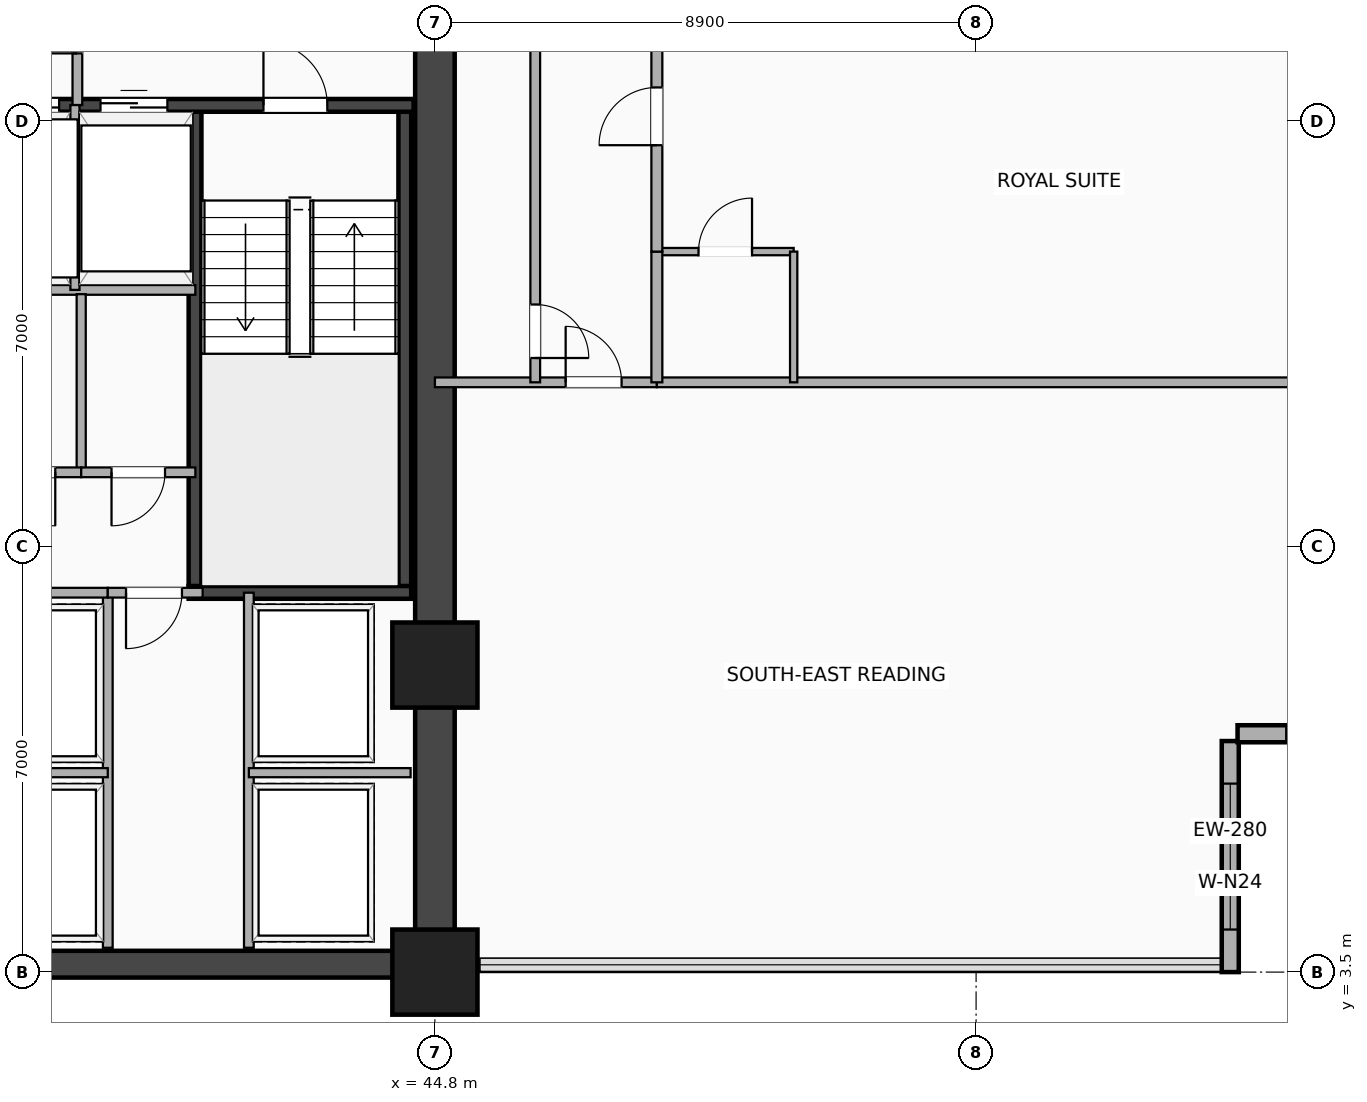
"""IFC4 building model, lengths in metres.
Left out: names, types, materials, properties, quantities, classifications, styles, units other than length and angle.
Written with IfcOpenShell. Run it as: python <this file> out.ifc"""

import sys

from ifc_helpers import new_model, si_unit, direction, frame, frame_2d, origin, origin_2d, place, context, subcontext, project, spatial, rectangle, extrude, element, fill, save


model = new_model("IFC4")
c1 = context("Model", 3, precision=1e-05, world=origin(), true_north=direction((0.0, 1.0)))
c2 = subcontext(c1, "Body", "Model", "MODEL_VIEW")
j1 = project(units=[si_unit("LENGTHUNIT", "METRE"), si_unit("PLANEANGLEUNIT", "RADIAN")], contexts=[c1])
p1 = place(None, origin())
s1 = spatial("IfcSite", under=j1, at=p1, CompositionType="ELEMENT")
p2 = place(p1, origin())
s2 = spatial("IfcBuilding", under=s1, at=p2, CompositionType="ELEMENT")
p3 = place(p2, frame((0.0, 0.0, 64.9)))
s3 = spatial("IfcBuildingStorey", under=s2, at=p3, CompositionType="ELEMENT", Elevation=64.9)
p4 = place(p3, frame((20.3, 3.63, 0.0), z_axis=(0.0, 0.0, 1.0), x_axis=(1.0, 0.0, 0.0)))
e1 = element("IfcWall", 1, at=p4, inside=s3, PredefinedType="SHEAR", context=c2, shape_type="SweptSolid", body=[
    extrude(rectangle(XDim=24.5, YDim=0.44, at=frame_2d((12.25, 0.0))), origin(), (0.0, 0.0, 1.0), 3.22),
])
p5 = place(p3, frame((44.8, 3.5, 0.0), z_axis=(0.0, 0.0, 1.0), x_axis=(0.0, 1.0, 0.0)))
e2 = element("IfcWall", 2, at=p5, inside=s3, PredefinedType="SHEAR", context=c2, shape_type="SweptSolid", body=[
    extrude(rectangle(XDim=16.9, YDim=0.65, at=frame_2d((8.45, 0.0))), origin(), (0.0, 0.0, 1.0), 3.22),
])
for number, where, z_axis, x_axis in (
    (3, (40.855, 9.745, 0.0), (0.0, 0.0, 1.0), (0.0, 1.0, 0.0)),
    (4, (44.305, 9.745, 0.0), (0.0, 0.0, 1.0), (0.0, 1.0, 0.0)),
):
    element("IfcWall", number, at=place(p3, frame(where, z_axis=z_axis, x_axis=x_axis)), inside=s3, PredefinedType="SHEAR", context=c2, shape_type="SweptSolid", body=[
        extrude(rectangle(XDim=8.01, YDim=0.21, at=frame_2d((4.005, 0.0))), origin(), (0.0, 0.0, 1.0), 3.22),
    ])
p6 = place(p3, frame((40.75, 9.745, 0.0), z_axis=(0.0, 0.0, 1.0), x_axis=(1.0, 0.0, 0.0)))
e5 = element("IfcWall", 5, at=p6, inside=s3, PredefinedType="SHEAR", context=c2, shape_type="SweptSolid", body=[
    extrude(rectangle(XDim=3.66, YDim=0.21, at=frame_2d((1.83, 0.0))), origin(), (0.0, 0.0, 1.0), 3.22),
])
p7 = place(p3, frame((37.25, 17.755, 0.0), z_axis=(0.0, 0.0, 1.0), x_axis=(1.0, 0.0, 0.0)))
e6 = element("IfcWall", 6, at=p7, inside=s3, PredefinedType="SHEAR", context=c2, shape_type="SweptSolid", body=[
    extrude(rectangle(XDim=7.2, YDim=0.21, at=frame_2d((3.6, 0.0))), origin(), (0.0, 0.0, 1.0), 3.22),
])
p8 = place(p7, frame((0.25, 0.0, 0.0)))
e7 = element("IfcOpeningElement", 7, at=p8, cuts=e6, PredefinedType="OPENING", context=c2, shape_type="SweptSolid", body=[
    extrude(rectangle(XDim=1.12, YDim=2.2, at=frame_2d((0.56, 1.1))), frame((0.0, 0.115, 0.0), z_axis=(0.0, -1.0, 0.0), x_axis=(1.0, 0.0, 0.0)), (0.0, 0.0, 1.0), 0.23),
])
p9 = place(p7, frame((2.05, 0.0, 0.0)))
e8 = element("IfcOpeningElement", 8, at=p9, cuts=e6, PredefinedType="OPENING", context=c2, shape_type="SweptSolid", body=[
    extrude(rectangle(XDim=1.1, YDim=2.18, at=frame_2d((0.55, 1.09))), frame((0.0, 0.115, 0.0), z_axis=(0.0, -1.0, 0.0), x_axis=(1.0, 0.0, 0.0)), (0.0, 0.0, 1.0), 0.23),
])
p10 = place(p7, frame((5.78, 0.0, 0.0), z_axis=(0.0, 0.0, 1.0), x_axis=(-1.0, 0.0, 0.0)))
e9 = element("IfcOpeningElement", 9, at=p10, cuts=e6, PredefinedType="OPENING", context=c2, shape_type="SweptSolid", body=[
    extrude(rectangle(XDim=1.05, YDim=2.15, at=frame_2d((0.525, 1.075))), frame((0.0, 0.115, 0.0), z_axis=(0.0, -1.0, 0.0), x_axis=(1.0, 0.0, 0.0)), (0.0, 0.0, 1.0), 0.23),
])
for number, where, z_axis, x_axis in (
    (10, (44.8, 3.5, -0.28), (0.0, 0.0, 1.0), (1.0, 0.0, 0.0)),
    (11, (44.8, 8.55, -0.28), (0.0, 0.0, 1.0), (1.0, 0.0, 0.0)),
):
    element("IfcColumn", number, at=place(p3, frame(where, z_axis=z_axis, x_axis=x_axis)), inside=s3, PredefinedType="COLUMN", context=c2, shape_type="SweptSolid", body=[
        extrude(rectangle(XDim=1.4, YDim=1.4, at=origin_2d()), origin(), (0.0, 0.0, 1.0), 3.5),
    ])
p11 = place(p3, frame((57.88, 3.5, 0.0), z_axis=(0.0, 0.0, 1.0), x_axis=(0.0, 1.0, 0.0)))
e12 = element("IfcWall", 12, at=p11, inside=s3, PredefinedType="SOLIDWALL", context=c2, shape_type="SweptSolid", body=[
    extrude(rectangle(XDim=3.8, YDim=0.28, at=frame_2d((1.9, 0.0))), origin(), (0.0, 0.0, 1.0), 3.22),
])
p12 = place(p11, frame((0.7, 0.0, 0.85)))
e13 = element("IfcOpeningElement", 13, at=p12, cuts=e12, PredefinedType="OPENING", context=c2, shape_type="SweptSolid", body=[
    extrude(rectangle(XDim=2.4, YDim=1.65, at=frame_2d((1.2, 0.825))), frame((0.0, 0.15, 0.0), z_axis=(0.0, -1.0, 0.0), x_axis=(1.0, 0.0, 0.0)), (0.0, 0.0, 1.0), 0.3),
])
p13 = place(p3, frame((58.0, 7.42, 0.0), z_axis=(0.0, 0.0, 1.0), x_axis=(1.0, 0.0, 0.0)))
e14 = element("IfcWall", 14, at=p13, inside=s3, PredefinedType="SOLIDWALL", context=c2, shape_type="SweptSolid", body=[
    extrude(rectangle(XDim=3.8, YDim=0.28, at=frame_2d((1.9, 0.0))), origin(), (0.0, 0.0, 1.0), 3.22),
])
p14 = place(p13, frame((0.8, 0.0, 0.85)))
e15 = element("IfcOpeningElement", 15, at=p14, cuts=e14, PredefinedType="OPENING", context=c2, shape_type="SweptSolid", body=[
    extrude(rectangle(XDim=2.2, YDim=1.65, at=frame_2d((1.1, 0.825))), frame((0.0, 0.15, 0.0), z_axis=(0.0, -1.0, 0.0), x_axis=(1.0, 0.0, 0.0)), (0.0, 0.0, 1.0), 0.3),
])
p15 = place(p3, frame((38.92, 17.76, 0.0), z_axis=(0.0, 0.0, 1.0), x_axis=(0.0, 1.0, 0.0)))
e16 = element("IfcWall", 16, at=p15, inside=s3, PredefinedType="PARTITIONING", context=c2, shape_type="SweptSolid", body=[
    extrude(rectangle(XDim=2.66, YDim=0.16, at=frame_2d((1.33, 0.0))), origin(), (0.0, 0.0, 1.0), 2.51),
])
p16 = place(p15, frame((1.77, 0.0, 0.0), z_axis=(0.0, 0.0, 1.0), x_axis=(-1.0, 0.0, 0.0)))
e17 = element("IfcOpeningElement", 17, at=p16, cuts=e16, PredefinedType="OPENING", context=c2, shape_type="SweptSolid", body=[
    extrude(rectangle(XDim=0.92, YDim=2.08, at=frame_2d((0.46, 1.04))), frame((0.0, 0.09, 0.0), z_axis=(0.0, -1.0, 0.0), x_axis=(1.0, 0.0, 0.0)), (0.0, 0.0, 1.0), 0.18),
])
p17 = place(p3, frame((37.25, 14.72, 0.0), z_axis=(0.0, 0.0, 1.0), x_axis=(1.0, 0.0, 0.0)))
e18 = element("IfcWall", 18, at=p17, inside=s3, PredefinedType="PARTITIONING", context=c2, shape_type="SweptSolid", body=[
    extrude(rectangle(XDim=3.61, YDim=0.16, at=frame_2d((1.805, 0.0))), origin(), (0.0, 0.0, 1.0), 3.22),
])
p18 = place(p3, frame((38.88, 14.72, 0.0), z_axis=(0.0, 0.0, 1.0), x_axis=(0.0, 1.0, 0.0)))
e19 = element("IfcWall", 19, at=p18, inside=s3, PredefinedType="PARTITIONING", context=c2, shape_type="SweptSolid", body=[
    extrude(rectangle(XDim=3.04, YDim=0.15, at=frame_2d((1.52, 0.0))), origin(), (0.0, 0.0, 1.0), 3.22),
])
p19 = place(p3, frame((38.983, 11.72, 0.0), z_axis=(0.0, 0.0, 1.0), x_axis=(0.0, 1.0, 0.0)))
e20 = element("IfcWall", 20, at=p19, inside=s3, PredefinedType="PARTITIONING", context=c2, shape_type="SweptSolid", body=[
    extrude(rectangle(XDim=2.93, YDim=0.15, at=frame_2d((1.465, 0.0))), origin(), (0.0, 0.0, 1.0), 3.22),
])
p20 = place(p3, frame((37.25, 11.72, 0.0), z_axis=(0.0, 0.0, 1.0), x_axis=(1.0, 0.0, 0.0)))
e21 = element("IfcWall", 21, at=p20, inside=s3, PredefinedType="PARTITIONING", context=c2, shape_type="SweptSolid", body=[
    extrude(rectangle(XDim=1.733, YDim=0.16, at=frame_2d((0.866, 0.0))), origin(), (0.0, 0.0, 1.0), 3.22),
])
p21 = place(p20, frame((0.427, 0.0, 0.0)))
e22 = element("IfcOpeningElement", 22, at=p21, cuts=e21, PredefinedType="OPENING", context=c2, shape_type="SweptSolid", body=[
    extrude(rectangle(XDim=0.88, YDim=2.08, at=frame_2d((0.44, 1.04))), frame((0.0, 0.09, 0.0), z_axis=(0.0, -1.0, 0.0), x_axis=(1.0, 0.0, 0.0)), (0.0, 0.0, 1.0), 0.18),
])
p22 = place(p3, frame((38.983, 11.72, 0.0), z_axis=(0.0, 0.0, 1.0), x_axis=(1.0, 0.0, 0.0)))
e23 = element("IfcWall", 23, at=p22, inside=s3, PredefinedType="PARTITIONING", context=c2, shape_type="SweptSolid", body=[
    extrude(rectangle(XDim=1.877, YDim=0.16, at=frame_2d((0.938, 0.0))), origin(), (0.0, 0.0, 1.0), 3.22),
])
p23 = place(p22, frame((0.499, 0.0, 0.0)))
e24 = element("IfcOpeningElement", 24, at=p23, cuts=e23, PredefinedType="OPENING", context=c2, shape_type="SweptSolid", body=[
    extrude(rectangle(XDim=0.88, YDim=2.08, at=frame_2d((0.44, 1.04))), frame((0.0, 0.09, 0.0), z_axis=(0.0, -1.0, 0.0), x_axis=(1.0, 0.0, 0.0)), (0.0, 0.0, 1.0), 0.18),
])
for number, where, z_axis, x_axis in (
    (25, (39.42, 3.9, 0.0), (0.0, 0.0, 1.0), (0.0, 1.0, 0.0)),
    (26, (41.74, 3.9, 0.0), (0.0, 0.0, 1.0), (0.0, 1.0, 0.0)),
):
    element("IfcWall", number, at=place(p3, frame(where, z_axis=z_axis, x_axis=x_axis)), inside=s3, PredefinedType="PARTITIONING", context=c2, shape_type="SweptSolid", body=[
        extrude(rectangle(XDim=5.84, YDim=0.16, at=frame_2d((2.92, 0.0))), origin(), (0.0, 0.0, 1.0), 3.22),
    ])
p24 = place(p3, frame((37.25, 6.78, 0.0), z_axis=(0.0, 0.0, 1.0), x_axis=(1.0, 0.0, 0.0)))
e27 = element("IfcWall", 27, at=p24, inside=s3, PredefinedType="PARTITIONING", context=c2, shape_type="SweptSolid", body=[
    extrude(rectangle(XDim=2.17, YDim=0.15, at=frame_2d((1.085, 0.0))), origin(), (0.0, 0.0, 1.0), 3.22),
])
p25 = place(p3, frame((41.74, 6.78, 0.0), z_axis=(0.0, 0.0, 1.0), x_axis=(1.0, 0.0, 0.0)))
e28 = element("IfcWall", 28, at=p25, inside=s3, PredefinedType="PARTITIONING", context=c2, shape_type="SweptSolid", body=[
    extrude(rectangle(XDim=2.66, YDim=0.15, at=frame_2d((1.33, 0.0))), origin(), (0.0, 0.0, 1.0), 2.51),
])
p26 = place(p3, frame((37.25, 9.74, 0.0), z_axis=(0.0, 0.0, 1.0), x_axis=(1.0, 0.0, 0.0)))
e29 = element("IfcWall", 29, at=p26, inside=s3, PredefinedType="PARTITIONING", context=c2, shape_type="SweptSolid", body=[
    extrude(rectangle(XDim=2.17, YDim=0.16, at=frame_2d((1.085, 0.0))), origin(), (0.0, 0.0, 1.0), 3.22),
])
p27 = place(p3, frame((39.42, 9.74, 0.0), z_axis=(0.0, 0.0, 1.0), x_axis=(1.0, 0.0, 0.0)))
e30 = element("IfcWall", 30, at=p27, inside=s3, PredefinedType="PARTITIONING", context=c2, shape_type="SweptSolid", body=[
    extrude(rectangle(XDim=1.56, YDim=0.16, at=frame_2d((0.78, 0.0))), origin(), (0.0, 0.0, 1.0), 3.22),
])
p28 = place(p27, frame((0.3, 0.0, 0.0)))
e31 = element("IfcOpeningElement", 31, at=p28, cuts=e30, PredefinedType="OPENING", context=c2, shape_type="SweptSolid", body=[
    extrude(rectangle(XDim=0.92, YDim=2.08, at=frame_2d((0.46, 1.04))), frame((0.0, 0.09, 0.0), z_axis=(0.0, -1.0, 0.0), x_axis=(1.0, 0.0, 0.0)), (0.0, 0.0, 1.0), 0.18),
])
p29 = place(p3, frame((44.8, 13.2, 0.0), z_axis=(0.0, 0.0, 1.0), x_axis=(1.0, 0.0, 0.0)))
e32 = element("IfcWall", 32, at=p29, inside=s3, PredefinedType="PARTITIONING", context=c2, shape_type="SweptSolid", body=[
    extrude(rectangle(XDim=3.65, YDim=0.16, at=frame_2d((1.825, 0.0))), origin(), (0.0, 0.0, 1.0), 2.51),
])
p30 = place(p29, frame((3.07, 0.0, 0.0), z_axis=(0.0, 0.0, 1.0), x_axis=(-1.0, 0.0, 0.0)))
e33 = element("IfcOpeningElement", 33, at=p30, cuts=e32, PredefinedType="OPENING", context=c2, shape_type="SweptSolid", body=[
    extrude(rectangle(XDim=0.92, YDim=2.08, at=frame_2d((0.46, 1.04))), frame((0.0, 0.09, 0.0), z_axis=(0.0, -1.0, 0.0), x_axis=(1.0, 0.0, 0.0)), (0.0, 0.0, 1.0), 0.18),
])
p31 = place(p3, frame((46.45, 13.2, 0.0), z_axis=(0.0, 0.0, 1.0), x_axis=(0.0, 1.0, 0.0)))
e34 = element("IfcWall", 34, at=p31, inside=s3, PredefinedType="PARTITIONING", context=c2, shape_type="SweptSolid", body=[
    extrude(rectangle(XDim=7.22, YDim=0.16, at=frame_2d((3.61, 0.0))), origin(), (0.0, 0.0, 1.0), 2.51),
])
p32 = place(p31, frame((0.4, 0.0, 0.0)))
e35 = element("IfcOpeningElement", 35, at=p32, cuts=e34, PredefinedType="OPENING", context=c2, shape_type="SweptSolid", body=[
    extrude(rectangle(XDim=0.88, YDim=2.08, at=frame_2d((0.44, 1.04))), frame((0.0, 0.09, 0.0), z_axis=(0.0, -1.0, 0.0), x_axis=(1.0, 0.0, 0.0)), (0.0, 0.0, 1.0), 0.18),
])
p33 = place(p3, frame((48.45, 13.2, 0.0), z_axis=(0.0, 0.0, 1.0), x_axis=(1.0, 0.0, 0.0)))
e36 = element("IfcWall", 36, at=p33, inside=s3, PredefinedType="PARTITIONING", context=c2, shape_type="SweptSolid", body=[
    extrude(rectangle(XDim=13.23, YDim=0.16, at=frame_2d((6.615, 0.0))), origin(), (0.0, 0.0, 1.0), 2.583),
])
p34 = place(p3, frame((48.45, 15.35, 0.0), z_axis=(0.0, 0.0, 1.0), x_axis=(1.0, 0.0, 0.0)))
e37 = element("IfcWall", 37, at=p34, inside=s3, PredefinedType="PARTITIONING", context=c2, shape_type="SweptSolid", body=[
    extrude(rectangle(XDim=2.25, YDim=0.12, at=frame_2d((1.125, 0.0))), origin(), (0.0, 0.0, 1.0), 3.22),
])
p35 = place(p34, frame((1.565, 0.0, 0.0), z_axis=(0.0, 0.0, 1.0), x_axis=(-1.0, 0.0, 0.0)))
e38 = element("IfcOpeningElement", 38, at=p35, cuts=e37, PredefinedType="OPENING", context=c2, shape_type="SweptSolid", body=[
    extrude(rectangle(XDim=0.88, YDim=2.08, at=frame_2d((0.44, 1.04))), frame((0.0, 0.07, 0.0), z_axis=(0.0, -1.0, 0.0), x_axis=(1.0, 0.0, 0.0)), (0.0, 0.0, 1.0), 0.14),
])
p36 = place(p3, frame((50.7, 13.2, 0.0), z_axis=(0.0, 0.0, 1.0), x_axis=(0.0, 1.0, 0.0)))
e39 = element("IfcWall", 39, at=p36, inside=s3, PredefinedType="PARTITIONING", context=c2, shape_type="SweptSolid", body=[
    extrude(rectangle(XDim=2.15, YDim=0.12, at=frame_2d((1.075, 0.0))), origin(), (0.0, 0.0, 1.0), 2.902),
])
p37 = place(p3, frame((48.45, 13.2, 0.0), z_axis=(0.0, 0.0, 1.0), x_axis=(0.0, 1.0, 0.0)))
e40 = element("IfcWall", 40, at=p37, inside=s3, PredefinedType="PARTITIONING", context=c2, shape_type="SweptSolid", body=[
    extrude(rectangle(XDim=2.15, YDim=0.18, at=frame_2d((1.075, 0.0))), origin(), (0.0, 0.0, 1.0), 2.902),
])
p38 = place(p3, frame((48.45, 15.35, 0.0), z_axis=(0.0, 0.0, 1.0), x_axis=(0.0, 1.0, 0.0)))
e41 = element("IfcWall", 41, at=p38, inside=s3, PredefinedType="PARTITIONING", context=c2, shape_type="SweptSolid", body=[
    extrude(rectangle(XDim=4.45, YDim=0.18, at=frame_2d((2.225, 0.0))), origin(), (0.0, 0.0, 1.0), 2.902),
])
p39 = place(p38, frame((2.7, 0.0, 0.0), z_axis=(0.0, 0.0, 1.0), x_axis=(-1.0, 0.0, 0.0)))
e42 = element("IfcOpeningElement", 42, at=p39, cuts=e41, PredefinedType="OPENING", context=c2, shape_type="SweptSolid", body=[
    extrude(rectangle(XDim=0.95, YDim=2.15, at=frame_2d((0.475, 1.075))), frame((0.0, 0.1, 0.0), z_axis=(0.0, -1.0, 0.0), x_axis=(1.0, 0.0, 0.0)), (0.0, 0.0, 1.0), 0.2),
])
p40 = place(p12, origin())
e43 = element("IfcWindow", 43, at=p40, inside=s3, PartitioningType="SINGLE_PANEL", PredefinedType="WINDOW", context=c2, shape_type="SweptSolid", body=[
    extrude(rectangle(XDim=2.4, YDim=1.65, at=frame_2d((1.2, 0.825))), frame((0.0, 0.03, 0.0), z_axis=(0.0, -1.0, 0.0), x_axis=(1.0, 0.0, 0.0)), (0.0, 0.0, 1.0), 0.06),
])
fill(e13, e43)
p41 = place(p14, origin())
e44 = element("IfcWindow", 44, at=p41, inside=s3, PartitioningType="SINGLE_PANEL", PredefinedType="WINDOW", context=c2, shape_type="SweptSolid", body=[
    extrude(rectangle(XDim=2.2, YDim=1.65, at=frame_2d((1.1, 0.825))), frame((0.0, 0.03, 0.0), z_axis=(0.0, -1.0, 0.0), x_axis=(1.0, 0.0, 0.0)), (0.0, 0.0, 1.0), 0.06),
])
fill(e15, e44)
p42 = place(p8, origin())
e45 = element("IfcDoor", 45, at=p42, inside=s3, OperationType="DOUBLE_DOOR_SLIDING", PredefinedType="DOOR", context=c2, shape_type="SweptSolid", body=[
    extrude(rectangle(XDim=1.12, YDim=2.2, at=frame_2d((0.56, 1.1))), frame((0.0, 0.025, 0.0), z_axis=(0.0, -1.0, 0.0), x_axis=(1.0, 0.0, 0.0)), (0.0, 0.0, 1.0), 0.05),
])
fill(e7, e45)
p43 = place(p9, origin())
e46 = element("IfcDoor", 46, at=p43, inside=s3, OperationType="DOUBLE_DOOR_SLIDING", PredefinedType="DOOR", context=c2, shape_type="SweptSolid", body=[
    extrude(rectangle(XDim=1.1, YDim=2.18, at=frame_2d((0.55, 1.09))), frame((0.0, 0.025, 0.0), z_axis=(0.0, -1.0, 0.0), x_axis=(1.0, 0.0, 0.0)), (0.0, 0.0, 1.0), 0.05),
])
fill(e8, e46)
p44 = place(p10, origin())
e47 = element("IfcDoor", 47, at=p44, inside=s3, OperationType="SINGLE_SWING_LEFT", PredefinedType="DOOR", context=c2, shape_type="SweptSolid", body=[
    extrude(rectangle(XDim=1.05, YDim=2.15, at=frame_2d((0.525, 1.075))), frame((0.0, 0.025, 0.0), z_axis=(0.0, -1.0, 0.0), x_axis=(1.0, 0.0, 0.0)), (0.0, 0.0, 1.0), 0.05),
])
fill(e9, e47)
p45 = place(p16, origin())
e48 = element("IfcDoor", 48, at=p45, inside=s3, OperationType="SINGLE_SWING_LEFT", PredefinedType="DOOR", context=c2, shape_type="SweptSolid", body=[
    extrude(rectangle(XDim=0.92, YDim=2.08, at=frame_2d((0.46, 1.04))), frame((0.0, 0.025, 0.0), z_axis=(0.0, -1.0, 0.0), x_axis=(1.0, 0.0, 0.0)), (0.0, 0.0, 1.0), 0.05),
])
fill(e17, e48)
p46 = place(p21, origin())
e49 = element("IfcDoor", 49, at=p46, inside=s3, OperationType="SINGLE_SWING_RIGHT", PredefinedType="DOOR", context=c2, shape_type="SweptSolid", body=[
    extrude(rectangle(XDim=0.88, YDim=2.08, at=frame_2d((0.44, 1.04))), frame((0.0, 0.025, 0.0), z_axis=(0.0, -1.0, 0.0), x_axis=(1.0, 0.0, 0.0)), (0.0, 0.0, 1.0), 0.05),
])
fill(e22, e49)
p47 = place(p23, origin())
e50 = element("IfcDoor", 50, at=p47, inside=s3, OperationType="SINGLE_SWING_LEFT", PredefinedType="DOOR", context=c2, shape_type="SweptSolid", body=[
    extrude(rectangle(XDim=0.88, YDim=2.08, at=frame_2d((0.44, 1.04))), frame((0.0, 0.025, 0.0), z_axis=(0.0, -1.0, 0.0), x_axis=(1.0, 0.0, 0.0)), (0.0, 0.0, 1.0), 0.05),
])
fill(e24, e50)
p48 = place(p28, origin())
e51 = element("IfcDoor", 51, at=p48, inside=s3, OperationType="SINGLE_SWING_LEFT", PredefinedType="DOOR", context=c2, shape_type="SweptSolid", body=[
    extrude(rectangle(XDim=0.92, YDim=2.08, at=frame_2d((0.46, 1.04))), frame((0.0, 0.025, 0.0), z_axis=(0.0, -1.0, 0.0), x_axis=(1.0, 0.0, 0.0)), (0.0, 0.0, 1.0), 0.05),
])
fill(e31, e51)
p49 = place(p30, origin())
e52 = element("IfcDoor", 52, at=p49, inside=s3, OperationType="SINGLE_SWING_LEFT", PredefinedType="DOOR", context=c2, shape_type="SweptSolid", body=[
    extrude(rectangle(XDim=0.92, YDim=2.08, at=frame_2d((0.46, 1.04))), frame((0.0, 0.025, 0.0), z_axis=(0.0, -1.0, 0.0), x_axis=(1.0, 0.0, 0.0)), (0.0, 0.0, 1.0), 0.05),
])
fill(e33, e52)
p50 = place(p32, origin())
e53 = element("IfcDoor", 53, at=p50, inside=s3, OperationType="SINGLE_SWING_LEFT", PredefinedType="DOOR", context=c2, shape_type="SweptSolid", body=[
    extrude(rectangle(XDim=0.88, YDim=2.08, at=frame_2d((0.44, 1.04))), frame((0.0, 0.025, 0.0), z_axis=(0.0, -1.0, 0.0), x_axis=(1.0, 0.0, 0.0)), (0.0, 0.0, 1.0), 0.05),
])
fill(e35, e53)
p51 = place(p35, origin())
e54 = element("IfcDoor", 54, at=p51, inside=s3, OperationType="SINGLE_SWING_RIGHT", PredefinedType="DOOR", context=c2, shape_type="SweptSolid", body=[
    extrude(rectangle(XDim=0.88, YDim=2.08, at=frame_2d((0.44, 1.04))), frame((0.0, 0.025, 0.0), z_axis=(0.0, -1.0, 0.0), x_axis=(1.0, 0.0, 0.0)), (0.0, 0.0, 1.0), 0.05),
])
fill(e38, e54)
p52 = place(p39, origin())
e55 = element("IfcDoor", 55, at=p52, inside=s3, OperationType="SINGLE_SWING_LEFT", PredefinedType="DOOR", context=c2, shape_type="SweptSolid", body=[
    extrude(rectangle(XDim=0.95, YDim=2.15, at=frame_2d((0.475, 1.075))), frame((0.0, 0.025, 0.0), z_axis=(0.0, -1.0, 0.0), x_axis=(1.0, 0.0, 0.0)), (0.0, 0.0, 1.0), 0.05),
])
fill(e42, e55)
save(model, sys.argv[1])
